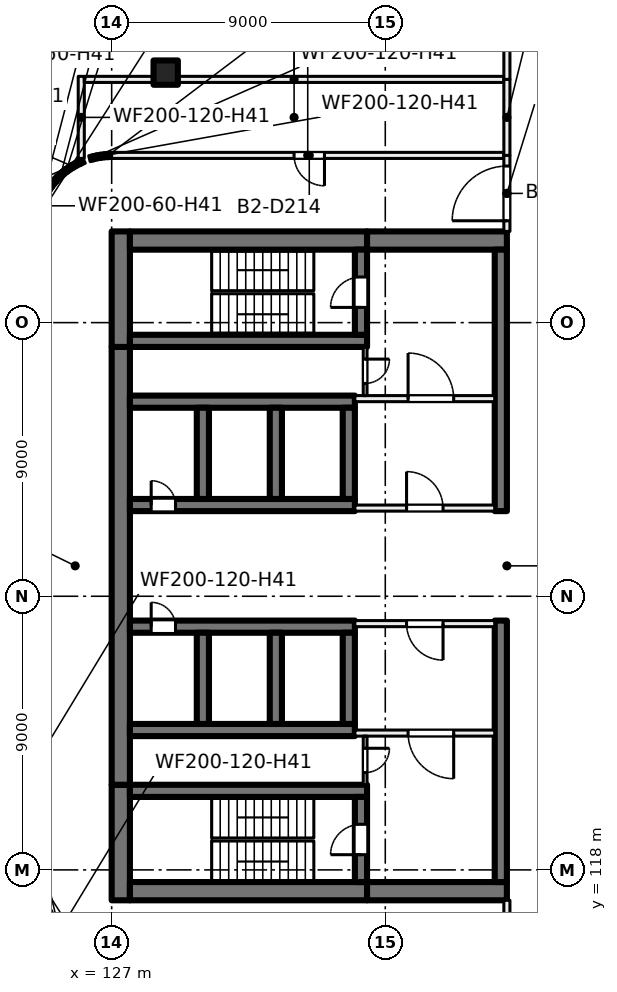
"""IFC4 building model, lengths in metres.
Left out: names, types, materials, properties, quantities, classifications, styles, units other than length and angle.
Written with IfcOpenShell. Run it as: python <this file> out.ifc"""

import sys

from ifc_helpers import new_model, si_unit, direction, frame, frame_2d, origin, origin_2d, place, context, subcontext, project, spatial, rectangle, extrude, element, fill, save


model = new_model("IFC4")
c1 = context("Model", 3, precision=1e-05, world=origin(), true_north=direction((0.0, 1.0)))
c2 = subcontext(c1, "Body", "Model", "MODEL_VIEW")
j1 = project(units=[si_unit("LENGTHUNIT", "METRE"), si_unit("PLANEANGLEUNIT", "RADIAN")], contexts=[c1])
p1 = place(None, origin())
s1 = spatial("IfcSite", under=j1, at=p1, CompositionType="ELEMENT")
p2 = place(p1, origin())
s2 = spatial("IfcBuilding", under=s1, at=p2, CompositionType="ELEMENT")
p3 = place(p2, frame((0.0, 0.0, -9.0)))
s3 = spatial("IfcBuildingStorey", under=s2, at=p3, CompositionType="ELEMENT", Elevation=-9.0)
p4 = place(p3, frame((128.777, 144.223, 0.0), z_axis=(0.0, 0.0, 1.0), x_axis=(1.0, 0.0, 0.0)))
e1 = element("IfcColumn", 1, at=p4, inside=s3, PredefinedType="COLUMN", context=c2, shape_type="SweptSolid", body=[
    extrude(rectangle(XDim=0.8, YDim=0.8, at=origin_2d()), origin(), (0.0, 0.0, 1.0), 4.5),
])
p5 = place(p3, frame((127.3, 117.0, 0.0), z_axis=(0.0, 0.0, 1.0), x_axis=(0.0, 1.0, 0.0)))
e2 = element("IfcWall", 2, at=p5, inside=s3, PredefinedType="SHEAR", context=c2, shape_type="SweptSolid", body=[
    extrude(rectangle(XDim=3.8, YDim=0.6, at=frame_2d((1.9, 0.0))), origin(), (0.0, 0.0, 1.0), 4.5),
])
p6 = place(p3, frame((127.3, 120.8, 0.0), z_axis=(0.0, 0.0, 1.0), x_axis=(0.0, 1.0, 0.0)))
e3 = element("IfcWall", 3, at=p6, inside=s3, PredefinedType="SHEAR", context=c2, shape_type="SweptSolid", body=[
    extrude(rectangle(XDim=14.4, YDim=0.6, at=frame_2d((7.2, 0.0))), origin(), (0.0, 0.0, 1.0), 4.5),
])
p7 = place(p3, frame((127.3, 135.2, 0.0), z_axis=(0.0, 0.0, 1.0), x_axis=(0.0, 1.0, 0.0)))
e4 = element("IfcWall", 4, at=p7, inside=s3, PredefinedType="SHEAR", context=c2, shape_type="SweptSolid", body=[
    extrude(rectangle(XDim=3.8, YDim=0.6, at=frame_2d((1.9, 0.0))), origin(), (0.0, 0.0, 1.0), 4.5),
])
for number, where, z_axis, x_axis in (
    (5, (127.6, 117.3, 0.0), (0.0, 0.0, 1.0), (1.0, 0.0, 0.0)),
    (6, (127.6, 138.7, 0.0), (0.0, 0.0, 1.0), (1.0, 0.0, 0.0)),
):
    element("IfcWall", number, at=place(p3, frame(where, z_axis=z_axis, x_axis=x_axis)), inside=s3, PredefinedType="SHEAR", context=c2, shape_type="SweptSolid", body=[
        extrude(rectangle(XDim=7.8, YDim=0.6, at=frame_2d((3.9, 0.0))), origin(), (0.0, 0.0, 1.0), 4.5),
    ])
for number, where, z_axis, x_axis in (
    (7, (135.4, 117.3, 0.0), (0.0, 0.0, 1.0), (1.0, 0.0, 0.0)),
    (8, (135.4, 138.7, 0.0), (0.0, 0.0, 1.0), (1.0, 0.0, 0.0)),
):
    element("IfcWall", number, at=place(p3, frame(where, z_axis=z_axis, x_axis=x_axis)), inside=s3, PredefinedType="SHEAR", context=c2, shape_type="SweptSolid", body=[
        extrude(rectangle(XDim=4.6, YDim=0.6, at=frame_2d((2.3, 0.0))), origin(), (0.0, 0.0, 1.0), 4.5),
    ])
p8 = place(p3, frame((127.6, 120.6, 0.0), z_axis=(0.0, 0.0, 1.0), x_axis=(1.0, 0.0, 0.0)))
e9 = element("IfcWall", 9, at=p8, inside=s3, PredefinedType="SHEAR", context=c2, shape_type="SweptSolid", body=[
    extrude(rectangle(XDim=7.8, YDim=0.4, at=frame_2d((3.9, 0.0))), origin(), (0.0, 0.0, 1.0), 4.5),
])
p9 = place(p3, frame((135.2, 117.6, 0.0), z_axis=(0.0, 0.0, 1.0), x_axis=(0.0, 1.0, 0.0)))
e10 = element("IfcWall", 10, at=p9, inside=s3, PredefinedType="SHEAR", context=c2, shape_type="SweptSolid", body=[
    extrude(rectangle(XDim=2.8, YDim=0.4, at=frame_2d((1.4, 0.0))), origin(), (0.0, 0.0, 1.0), 4.5),
])
p10 = place(p9, frame((0.9, 0.0, 0.0)))
e11 = element("IfcOpeningElement", 11, at=p10, cuts=e10, PredefinedType="OPENING", context=c2, shape_type="SweptSolid", body=[
    extrude(rectangle(XDim=1.0, YDim=2.1, at=frame_2d((0.5, 1.05))), frame((0.0, 0.21, 0.0), z_axis=(0.0, -1.0, 0.0), x_axis=(1.0, 0.0, 0.0)), (0.0, 0.0, 1.0), 0.42),
])
p11 = place(p3, frame((127.6, 135.4, 0.0), z_axis=(0.0, 0.0, 1.0), x_axis=(1.0, 0.0, 0.0)))
e12 = element("IfcWall", 12, at=p11, inside=s3, PredefinedType="SHEAR", context=c2, shape_type="SweptSolid", body=[
    extrude(rectangle(XDim=7.8, YDim=0.4, at=frame_2d((3.9, 0.0))), origin(), (0.0, 0.0, 1.0), 4.5),
])
p12 = place(p3, frame((135.2, 135.6, 0.0), z_axis=(0.0, 0.0, 1.0), x_axis=(0.0, 1.0, 0.0)))
e13 = element("IfcWall", 13, at=p12, inside=s3, PredefinedType="SHEAR", context=c2, shape_type="SweptSolid", body=[
    extrude(rectangle(XDim=2.8, YDim=0.4, at=frame_2d((1.4, 0.0))), origin(), (0.0, 0.0, 1.0), 4.5),
])
p13 = place(p12, frame((0.9, 0.0, 0.0)))
e14 = element("IfcOpeningElement", 14, at=p13, cuts=e13, PredefinedType="OPENING", context=c2, shape_type="SweptSolid", body=[
    extrude(rectangle(XDim=1.0, YDim=2.1, at=frame_2d((0.5, 1.05))), frame((0.0, 0.21, 0.0), z_axis=(0.0, -1.0, 0.0), x_axis=(1.0, 0.0, 0.0)), (0.0, 0.0, 1.0), 0.42),
])
p14 = place(p3, frame((127.6, 126.0, 0.0), z_axis=(0.0, 0.0, 1.0), x_axis=(1.0, 0.0, 0.0)))
e15 = element("IfcWall", 15, at=p14, inside=s3, PredefinedType="SHEAR", context=c2, shape_type="SweptSolid", body=[
    extrude(rectangle(XDim=7.4, YDim=0.4, at=frame_2d((3.7, 0.0))), origin(), (0.0, 0.0, 1.0), 4.5),
])
p15 = place(p14, frame((0.7, 0.0, 0.0)))
e16 = element("IfcOpeningElement", 16, at=p15, cuts=e15, PredefinedType="OPENING", context=c2, shape_type="SweptSolid", body=[
    extrude(rectangle(XDim=0.8, YDim=2.1, at=frame_2d((0.4, 1.05))), frame((0.0, 0.21, 0.0), z_axis=(0.0, -1.0, 0.0), x_axis=(1.0, 0.0, 0.0)), (0.0, 0.0, 1.0), 0.42),
])
p16 = place(p3, frame((127.6, 122.6, 0.0), z_axis=(0.0, 0.0, 1.0), x_axis=(1.0, 0.0, 0.0)))
e17 = element("IfcWall", 17, at=p16, inside=s3, PredefinedType="SHEAR", context=c2, shape_type="SweptSolid", body=[
    extrude(rectangle(XDim=7.4, YDim=0.4, at=frame_2d((3.7, 0.0))), origin(), (0.0, 0.0, 1.0), 4.5),
])
for number, where, z_axis, x_axis in (
    (18, (130.0, 122.8, 0.0), (0.0, 0.0, 1.0), (0.0, 1.0, 0.0)),
    (19, (132.4, 122.8, 0.0), (0.0, 0.0, 1.0), (0.0, 1.0, 0.0)),
    (20, (134.8, 122.8, 0.0), (0.0, 0.0, 1.0), (0.0, 1.0, 0.0)),
):
    element("IfcWall", number, at=place(p3, frame(where, z_axis=z_axis, x_axis=x_axis)), inside=s3, PredefinedType="SHEAR", context=c2, shape_type="SweptSolid", body=[
        extrude(rectangle(XDim=3.0, YDim=0.4, at=frame_2d((1.5, 0.0))), origin(), (0.0, 0.0, 1.0), 4.5),
    ])
p17 = place(p3, frame((127.6, 130.0, 0.0), z_axis=(0.0, 0.0, 1.0), x_axis=(1.0, 0.0, 0.0)))
e21 = element("IfcWall", 21, at=p17, inside=s3, PredefinedType="SHEAR", context=c2, shape_type="SweptSolid", body=[
    extrude(rectangle(XDim=7.4, YDim=0.4, at=frame_2d((3.7, 0.0))), origin(), (0.0, 0.0, 1.0), 4.5),
])
p18 = place(p17, frame((0.7, 0.0, 0.0)))
e22 = element("IfcOpeningElement", 22, at=p18, cuts=e21, PredefinedType="OPENING", context=c2, shape_type="SweptSolid", body=[
    extrude(rectangle(XDim=0.8, YDim=2.1, at=frame_2d((0.4, 1.05))), frame((0.0, 0.21, 0.0), z_axis=(0.0, -1.0, 0.0), x_axis=(1.0, 0.0, 0.0)), (0.0, 0.0, 1.0), 0.42),
])
p19 = place(p3, frame((127.6, 133.4, 0.0), z_axis=(0.0, 0.0, 1.0), x_axis=(1.0, 0.0, 0.0)))
e23 = element("IfcWall", 23, at=p19, inside=s3, PredefinedType="SHEAR", context=c2, shape_type="SweptSolid", body=[
    extrude(rectangle(XDim=7.4, YDim=0.4, at=frame_2d((3.7, 0.0))), origin(), (0.0, 0.0, 1.0), 4.5),
])
for number, where, z_axis, x_axis in (
    (24, (130.0, 130.2, 0.0), (0.0, 0.0, 1.0), (0.0, 1.0, 0.0)),
    (25, (132.4, 130.2, 0.0), (0.0, 0.0, 1.0), (0.0, 1.0, 0.0)),
    (26, (134.8, 130.2, 0.0), (0.0, 0.0, 1.0), (0.0, 1.0, 0.0)),
):
    element("IfcWall", number, at=place(p3, frame(where, z_axis=z_axis, x_axis=x_axis)), inside=s3, PredefinedType="SHEAR", context=c2, shape_type="SweptSolid", body=[
        extrude(rectangle(XDim=3.0, YDim=0.4, at=frame_2d((1.5, 0.0))), origin(), (0.0, 0.0, 1.0), 4.5),
    ])
for number, where, z_axis, x_axis in (
    (27, (139.8, 117.6, 0.0), (0.0, 0.0, 1.0), (0.0, 1.0, 0.0)),
    (28, (139.8, 129.8, 0.0), (0.0, 0.0, 1.0), (0.0, 1.0, 0.0)),
):
    element("IfcWall", number, at=place(p3, frame(where, z_axis=z_axis, x_axis=x_axis)), inside=s3, PredefinedType="SHEAR", context=c2, shape_type="SweptSolid", body=[
        extrude(rectangle(XDim=8.6, YDim=0.4, at=frame_2d((4.3, 0.0))), origin(), (0.0, 0.0, 1.0), 4.5),
    ])
p20 = place(p3, frame((135.0, 129.9, 0.0), z_axis=(0.0, 0.0, 1.0), x_axis=(1.0, 0.0, 0.0)))
e29 = element("IfcWall", 29, at=p20, inside=s3, PredefinedType="PARTITIONING", context=c2, shape_type="SweptSolid", body=[
    extrude(rectangle(XDim=4.6, YDim=0.2, at=frame_2d((2.3, 0.0))), origin(), (0.0, 0.0, 1.0), 4.125),
])
p21 = place(p20, frame((1.7, 0.0, 0.0)))
e30 = element("IfcOpeningElement", 30, at=p21, cuts=e29, PredefinedType="OPENING", context=c2, shape_type="SweptSolid", body=[
    extrude(rectangle(XDim=1.2, YDim=2.1, at=frame_2d((0.6, 1.05))), frame((0.0, 0.11, 0.0), z_axis=(0.0, -1.0, 0.0), x_axis=(1.0, 0.0, 0.0)), (0.0, 0.0, 1.0), 0.22),
])
p22 = place(p3, frame((135.0, 133.5, 0.0), z_axis=(0.0, 0.0, 1.0), x_axis=(1.0, 0.0, 0.0)))
e31 = element("IfcWall", 31, at=p22, inside=s3, PredefinedType="PARTITIONING", context=c2, shape_type="SweptSolid", body=[
    extrude(rectangle(XDim=4.6, YDim=0.2, at=frame_2d((2.3, 0.0))), origin(), (0.0, 0.0, 1.0), 4.125),
])
p23 = place(p22, frame((1.75, 0.0, 0.0)))
e32 = element("IfcOpeningElement", 32, at=p23, cuts=e31, PredefinedType="OPENING", context=c2, shape_type="SweptSolid", body=[
    extrude(rectangle(XDim=1.5, YDim=2.1, at=frame_2d((0.75, 1.05))), frame((0.0, 0.11, 0.0), z_axis=(0.0, -1.0, 0.0), x_axis=(1.0, 0.0, 0.0)), (0.0, 0.0, 1.0), 0.22),
])
p24 = place(p3, frame((135.337, 135.2, 0.0), z_axis=(0.0, 0.0, 1.0), x_axis=(0.0, -1.0, 0.0)))
e33 = element("IfcWall", 33, at=p24, inside=s3, PredefinedType="PARTITIONING", context=c2, shape_type="SweptSolid", body=[
    extrude(rectangle(XDim=1.6, YDim=0.125, at=frame_2d((0.8, 0.0))), origin(), (0.0, 0.0, 1.0), 4.125),
])
p25 = place(p24, frame((0.4, 0.0, 0.0)))
e34 = element("IfcOpeningElement", 34, at=p25, cuts=e33, PredefinedType="OPENING", context=c2, shape_type="SweptSolid", body=[
    extrude(rectangle(XDim=0.8, YDim=2.1, at=frame_2d((0.4, 1.05))), frame((0.0, 0.073, 0.0), z_axis=(0.0, -1.0, 0.0), x_axis=(1.0, 0.0, 0.0)), (0.0, 0.0, 1.0), 0.145),
])
p26 = place(p3, frame((139.6, 126.1, 0.0), z_axis=(0.0, 0.0, 1.0), x_axis=(-1.0, 0.0, 0.0)))
e35 = element("IfcWall", 35, at=p26, inside=s3, PredefinedType="PARTITIONING", context=c2, shape_type="SweptSolid", body=[
    extrude(rectangle(XDim=4.6, YDim=0.2, at=frame_2d((2.3, 0.0))), origin(), (0.0, 0.0, 1.0), 4.125),
])
p27 = place(p26, frame((1.7, 0.0, 0.0)))
e36 = element("IfcOpeningElement", 36, at=p27, cuts=e35, PredefinedType="OPENING", context=c2, shape_type="SweptSolid", body=[
    extrude(rectangle(XDim=1.2, YDim=2.1, at=frame_2d((0.6, 1.05))), frame((0.0, 0.11, 0.0), z_axis=(0.0, -1.0, 0.0), x_axis=(1.0, 0.0, 0.0)), (0.0, 0.0, 1.0), 0.22),
])
p28 = place(p3, frame((139.6, 122.5, 0.0), z_axis=(0.0, 0.0, 1.0), x_axis=(-1.0, 0.0, 0.0)))
e37 = element("IfcWall", 37, at=p28, inside=s3, PredefinedType="PARTITIONING", context=c2, shape_type="SweptSolid", body=[
    extrude(rectangle(XDim=4.6, YDim=0.2, at=frame_2d((2.3, 0.0))), origin(), (0.0, 0.0, 1.0), 4.125),
])
p29 = place(p28, frame((1.35, 0.0, 0.0)))
e38 = element("IfcOpeningElement", 38, at=p29, cuts=e37, PredefinedType="OPENING", context=c2, shape_type="SweptSolid", body=[
    extrude(rectangle(XDim=1.5, YDim=2.1, at=frame_2d((0.75, 1.05))), frame((0.0, 0.11, 0.0), z_axis=(0.0, -1.0, 0.0), x_axis=(1.0, 0.0, 0.0)), (0.0, 0.0, 1.0), 0.22),
])
p30 = place(p3, frame((135.337, 122.4, 0.0), z_axis=(0.0, 0.0, 1.0), x_axis=(0.0, -1.0, 0.0)))
e39 = element("IfcWall", 39, at=p30, inside=s3, PredefinedType="PARTITIONING", context=c2, shape_type="SweptSolid", body=[
    extrude(rectangle(XDim=1.6, YDim=0.125, at=frame_2d((0.8, 0.0))), origin(), (0.0, 0.0, 1.0), 4.125),
])
p31 = place(p30, frame((0.4, 0.0, 0.0)))
e40 = element("IfcOpeningElement", 40, at=p31, cuts=e39, PredefinedType="OPENING", context=c2, shape_type="SweptSolid", body=[
    extrude(rectangle(XDim=0.8, YDim=2.1, at=frame_2d((0.4, 1.05))), frame((0.0, 0.073, 0.0), z_axis=(0.0, -1.0, 0.0), x_axis=(1.0, 0.0, 0.0)), (0.0, 0.0, 1.0), 0.145),
])
p32 = place(p3, frame((124.918, 140.385, 0.0), z_axis=(0.0, 0.0, 1.0), x_axis=(0.595707657713, 0.803201336243, 0.0)))
e41 = element("IfcWall", 41, at=p32, inside=s3, PredefinedType="PARTITIONING", context=c2, shape_type="SweptSolid", body=[
    extrude(rectangle(XDim=0.255, YDim=0.2, at=frame_2d((0.128, 0.0))), origin(), (0.0, 0.0, 1.0), 4.125),
])
for number, where, z_axis, x_axis in (
    (42, (125.064, 140.582, 0.0), (0.0, 0.0, 1.0), (0.669, 0.743, 0.0)),
    (43, (125.228, 140.765, 0.0), (0.0, 0.0, 1.0), (0.743, 0.669, 0.0)),
):
    element("IfcWall", number, at=place(p3, frame(where, z_axis=z_axis, x_axis=x_axis)), inside=s3, PredefinedType="PARTITIONING", context=c2, shape_type="SweptSolid", body=[
        extrude(rectangle(XDim=0.256, YDim=0.2, at=frame_2d((0.128, 0.0))), origin(), (0.0, 0.0, 1.0), 4.125),
    ])
p33 = place(p3, frame((125.41, 140.93, 0.0), z_axis=(0.0, 0.0, 1.0), x_axis=(0.803201336243, 0.595707657713, 0.0)))
e44 = element("IfcWall", 44, at=p33, inside=s3, PredefinedType="PARTITIONING", context=c2, shape_type="SweptSolid", body=[
    extrude(rectangle(XDim=0.255, YDim=0.2, at=frame_2d((0.128, 0.0))), origin(), (0.0, 0.0, 1.0), 4.125),
])
p34 = place(p3, frame((125.607, 141.076, 0.0), z_axis=(0.0, 0.0, 1.0), x_axis=(0.857998903579, 0.513651517527, 0.0)))
e45 = element("IfcWall", 45, at=p34, inside=s3, PredefinedType="PARTITIONING", context=c2, shape_type="SweptSolid", body=[
    extrude(rectangle(XDim=0.255, YDim=0.2, at=frame_2d((0.127, 0.0))), origin(), (0.0, 0.0, 1.0), 4.125),
])
p35 = place(p3, frame((125.818, 141.203, 0.0), z_axis=(0.0, 0.0, 1.0), x_axis=(0.902065692634, 0.431598755991, 0.0)))
e46 = element("IfcWall", 46, at=p35, inside=s3, PredefinedType="PARTITIONING", context=c2, shape_type="SweptSolid", body=[
    extrude(rectangle(XDim=0.302, YDim=0.2, at=frame_2d((0.151, 0.0))), origin(), (0.0, 0.0, 1.0), 4.125),
])
p36 = place(p3, frame((126.0, 141.401, 0.0), z_axis=(0.0, 0.0, 1.0), x_axis=(0.0, 1.0, 0.0)))
e47 = element("IfcWall", 47, at=p36, inside=s3, PredefinedType="PARTITIONING", context=c2, shape_type="SweptSolid", body=[
    extrude(rectangle(XDim=2.699, YDim=0.2, at=frame_2d((1.35, 0.0))), origin(), (0.0, 0.0, 1.0), 4.125),
])
p37 = place(p3, frame((126.1, 144.0, 0.0), z_axis=(0.0, 0.0, 1.0), x_axis=(1.0, 0.0, 0.0)))
e48 = element("IfcWall", 48, at=p37, inside=s3, PredefinedType="PARTITIONING", context=c2, shape_type="SweptSolid", body=[
    extrude(rectangle(XDim=13.8, YDim=0.2, at=frame_2d((6.9, 0.0))), origin(), (0.0, 0.0, 1.0), 4.125),
])
p38 = place(p3, frame((126.269, 141.391, 0.0), z_axis=(0.0, 0.0, 1.0), x_axis=(0.970366809683, 0.241636616978, 0.0)))
e49 = element("IfcWall", 49, at=p38, inside=s3, PredefinedType="PARTITIONING", context=c2, shape_type="SweptSolid", body=[
    extrude(rectangle(XDim=0.256, YDim=0.2, at=frame_2d((0.128, 0.0))), origin(), (0.0, 0.0, 1.0), 4.125),
])
p39 = place(p3, frame((126.507, 141.451, 0.0), z_axis=(0.0, 0.0, 1.0), x_axis=(0.988852180426, 0.148900521377, 0.0)))
e50 = element("IfcWall", 50, at=p39, inside=s3, PredefinedType="PARTITIONING", context=c2, shape_type="SweptSolid", body=[
    extrude(rectangle(XDim=0.256, YDim=0.2, at=frame_2d((0.128, 0.0))), origin(), (0.0, 0.0, 1.0), 4.125),
])
p40 = place(p3, frame((126.75, 141.488, 0.0), z_axis=(0.0, 0.0, 1.0), x_axis=(0.998874697667, 0.047427190102, 0.0)))
e51 = element("IfcWall", 51, at=p40, inside=s3, PredefinedType="PARTITIONING", context=c2, shape_type="SweptSolid", body=[
    extrude(rectangle(XDim=0.252, YDim=0.2, at=frame_2d((0.126, 0.0))), origin(), (0.0, 0.0, 1.0), 4.125),
])
p41 = place(p3, frame((126.998, 141.5, 0.0), z_axis=(0.0, 0.0, 1.0), x_axis=(1.0, 0.0, 0.0)))
e52 = element("IfcWall", 52, at=p41, inside=s3, PredefinedType="PARTITIONING", context=c2, shape_type="SweptSolid", body=[
    extrude(rectangle(XDim=12.902, YDim=0.2, at=frame_2d((6.451, 0.0))), origin(), (0.0, 0.0, 1.0), 4.125),
])
p42 = place(p41, frame((6.002, 0.0, 0.0)))
e53 = element("IfcOpeningElement", 53, at=p42, cuts=e52, PredefinedType="OPENING", context=c2, shape_type="SweptSolid", body=[
    extrude(rectangle(XDim=1.0, YDim=2.1, at=frame_2d((0.5, 1.05))), frame((0.0, 0.11, 0.0), z_axis=(0.0, -1.0, 0.0), x_axis=(1.0, 0.0, 0.0)), (0.0, 0.0, 1.0), 0.22),
])
p43 = place(p3, frame((140.0, 103.9, 0.0), z_axis=(0.0, 0.0, 1.0), x_axis=(0.0, 1.0, 0.0)))
e54 = element("IfcWall", 54, at=p43, inside=s3, PredefinedType="PARTITIONING", context=c2, shape_type="SweptSolid", body=[
    extrude(rectangle(XDim=13.1, YDim=0.2, at=frame_2d((6.55, 0.0))), origin(), (0.0, 0.0, 1.0), 4.125),
])
p44 = place(p3, frame((140.0, 139.0, 0.0), z_axis=(0.0, 0.0, 1.0), x_axis=(0.0, 1.0, 0.0)))
e55 = element("IfcWall", 55, at=p44, inside=s3, PredefinedType="PARTITIONING", context=c2, shape_type="SweptSolid", body=[
    extrude(rectangle(XDim=2.5, YDim=0.2, at=frame_2d((1.25, 0.0))), origin(), (0.0, 0.0, 1.0), 4.125),
])
p45 = place(p44, frame((0.35, 0.0, 0.0)))
e56 = element("IfcOpeningElement", 56, at=p45, cuts=e55, PredefinedType="OPENING", context=c2, shape_type="SweptSolid", body=[
    extrude(rectangle(XDim=1.8, YDim=2.1, at=frame_2d((0.9, 1.05))), frame((0.0, 0.11, 0.0), z_axis=(0.0, -1.0, 0.0), x_axis=(1.0, 0.0, 0.0)), (0.0, 0.0, 1.0), 0.22),
])
p46 = place(p3, frame((140.0, 141.5, 0.0), z_axis=(0.0, 0.0, 1.0), x_axis=(0.0, 1.0, 0.0)))
e57 = element("IfcWall", 57, at=p46, inside=s3, PredefinedType="PARTITIONING", context=c2, shape_type="SweptSolid", body=[
    extrude(rectangle(XDim=2.5, YDim=0.2, at=frame_2d((1.25, 0.0))), origin(), (0.0, 0.0, 1.0), 4.125),
])
p47 = place(p3, frame((140.0, 144.0, 0.0), z_axis=(0.0, 0.0, 1.0), x_axis=(0.0, 1.0, 0.0)))
e58 = element("IfcWall", 58, at=p47, inside=s3, PredefinedType="PARTITIONING", context=c2, shape_type="SweptSolid", body=[
    extrude(rectangle(XDim=8.1, YDim=0.2, at=frame_2d((4.05, 0.0))), origin(), (0.0, 0.0, 1.0), 4.125),
])
p48 = place(p18, origin())
e59 = element("IfcDoor", 59, at=p48, inside=s3, OperationType="SINGLE_SWING_LEFT", PredefinedType="DOOR", context=c2, shape_type="SweptSolid", body=[
    extrude(rectangle(XDim=0.8, YDim=2.1, at=frame_2d((0.4, 1.05))), frame((0.0, 0.025, 0.0), z_axis=(0.0, -1.0, 0.0), x_axis=(1.0, 0.0, 0.0)), (0.0, 0.0, 1.0), 0.05),
])
fill(e22, e59)
p49 = place(p15, origin())
e60 = element("IfcDoor", 60, at=p49, inside=s3, OperationType="SINGLE_SWING_RIGHT", PredefinedType="DOOR", context=c2, shape_type="SweptSolid", body=[
    extrude(rectangle(XDim=0.8, YDim=2.1, at=frame_2d((0.4, 1.05))), frame((0.0, 0.025, 0.0), z_axis=(0.0, -1.0, 0.0), x_axis=(1.0, 0.0, 0.0)), (0.0, 0.0, 1.0), 0.05),
])
fill(e16, e60)
p50 = place(p21, origin())
e61 = element("IfcDoor", 61, at=p50, inside=s3, OperationType="DOUBLE_DOOR_SINGLE_SWING", PredefinedType="DOOR", context=c2, shape_type="SweptSolid", body=[
    extrude(rectangle(XDim=1.2, YDim=2.1, at=frame_2d((0.6, 1.05))), frame((0.0, 0.025, 0.0), z_axis=(0.0, -1.0, 0.0), x_axis=(1.0, 0.0, 0.0)), (0.0, 0.0, 1.0), 0.05),
])
fill(e30, e61)
p51 = place(p23, origin())
e62 = element("IfcDoor", 62, at=p51, inside=s3, OperationType="DOUBLE_DOOR_SINGLE_SWING", PredefinedType="DOOR", context=c2, shape_type="SweptSolid", body=[
    extrude(rectangle(XDim=1.5, YDim=2.1, at=frame_2d((0.75, 1.05))), frame((0.0, 0.025, 0.0), z_axis=(0.0, -1.0, 0.0), x_axis=(1.0, 0.0, 0.0)), (0.0, 0.0, 1.0), 0.05),
])
fill(e32, e62)
p52 = place(p13, origin())
e63 = element("IfcDoor", 63, at=p52, inside=s3, OperationType="SINGLE_SWING_LEFT", PredefinedType="DOOR", context=c2, shape_type="SweptSolid", body=[
    extrude(rectangle(XDim=1.0, YDim=2.1, at=frame_2d((0.5, 1.05))), frame((0.0, 0.025, 0.0), z_axis=(0.0, -1.0, 0.0), x_axis=(1.0, 0.0, 0.0)), (0.0, 0.0, 1.0), 0.05),
])
fill(e14, e63)
p53 = place(p25, origin())
e64 = element("IfcDoor", 64, at=p53, inside=s3, OperationType="SINGLE_SWING_RIGHT", PredefinedType="DOOR", context=c2, shape_type="SweptSolid", body=[
    extrude(rectangle(XDim=0.8, YDim=2.1, at=frame_2d((0.4, 1.05))), frame((0.0, 0.025, 0.0), z_axis=(0.0, -1.0, 0.0), x_axis=(1.0, 0.0, 0.0)), (0.0, 0.0, 1.0), 0.05),
])
fill(e34, e64)
p54 = place(p27, origin())
e65 = element("IfcDoor", 65, at=p54, inside=s3, OperationType="DOUBLE_DOOR_SINGLE_SWING", PredefinedType="DOOR", context=c2, shape_type="SweptSolid", body=[
    extrude(rectangle(XDim=1.2, YDim=2.1, at=frame_2d((0.6, 1.05))), frame((0.0, 0.025, 0.0), z_axis=(0.0, -1.0, 0.0), x_axis=(1.0, 0.0, 0.0)), (0.0, 0.0, 1.0), 0.05),
])
fill(e36, e65)
p55 = place(p29, origin())
e66 = element("IfcDoor", 66, at=p55, inside=s3, OperationType="DOUBLE_DOOR_SINGLE_SWING", PredefinedType="DOOR", context=c2, shape_type="SweptSolid", body=[
    extrude(rectangle(XDim=1.5, YDim=2.1, at=frame_2d((0.75, 1.05))), frame((0.0, 0.025, 0.0), z_axis=(0.0, -1.0, 0.0), x_axis=(1.0, 0.0, 0.0)), (0.0, 0.0, 1.0), 0.05),
])
fill(e38, e66)
p56 = place(p10, origin())
e67 = element("IfcDoor", 67, at=p56, inside=s3, OperationType="SINGLE_SWING_RIGHT", PredefinedType="DOOR", context=c2, shape_type="SweptSolid", body=[
    extrude(rectangle(XDim=1.0, YDim=2.1, at=frame_2d((0.5, 1.05))), frame((0.0, 0.025, 0.0), z_axis=(0.0, -1.0, 0.0), x_axis=(1.0, 0.0, 0.0)), (0.0, 0.0, 1.0), 0.05),
])
fill(e11, e67)
p57 = place(p31, origin())
e68 = element("IfcDoor", 68, at=p57, inside=s3, OperationType="SINGLE_SWING_LEFT", PredefinedType="DOOR", context=c2, shape_type="SweptSolid", body=[
    extrude(rectangle(XDim=0.8, YDim=2.1, at=frame_2d((0.4, 1.05))), frame((0.0, 0.025, 0.0), z_axis=(0.0, -1.0, 0.0), x_axis=(1.0, 0.0, 0.0)), (0.0, 0.0, 1.0), 0.05),
])
fill(e40, e68)
p58 = place(p42, origin())
e69 = element("IfcDoor", 69, at=p58, inside=s3, OperationType="SINGLE_SWING_RIGHT", PredefinedType="DOOR", context=c2, shape_type="SweptSolid", body=[
    extrude(rectangle(XDim=1.0, YDim=2.1, at=frame_2d((0.5, 1.05))), frame((0.0, 0.025, 0.0), z_axis=(0.0, -1.0, 0.0), x_axis=(1.0, 0.0, 0.0)), (0.0, 0.0, 1.0), 0.05),
])
fill(e53, e69)
p59 = place(p45, origin())
e70 = element("IfcDoor", 70, at=p59, inside=s3, OperationType="DOUBLE_DOOR_SINGLE_SWING", PredefinedType="DOOR", context=c2, shape_type="SweptSolid", body=[
    extrude(rectangle(XDim=1.8, YDim=2.1, at=frame_2d((0.9, 1.05))), frame((0.0, 0.025, 0.0), z_axis=(0.0, -1.0, 0.0), x_axis=(1.0, 0.0, 0.0)), (0.0, 0.0, 1.0), 0.05),
])
fill(e56, e70)
save(model, sys.argv[1])
